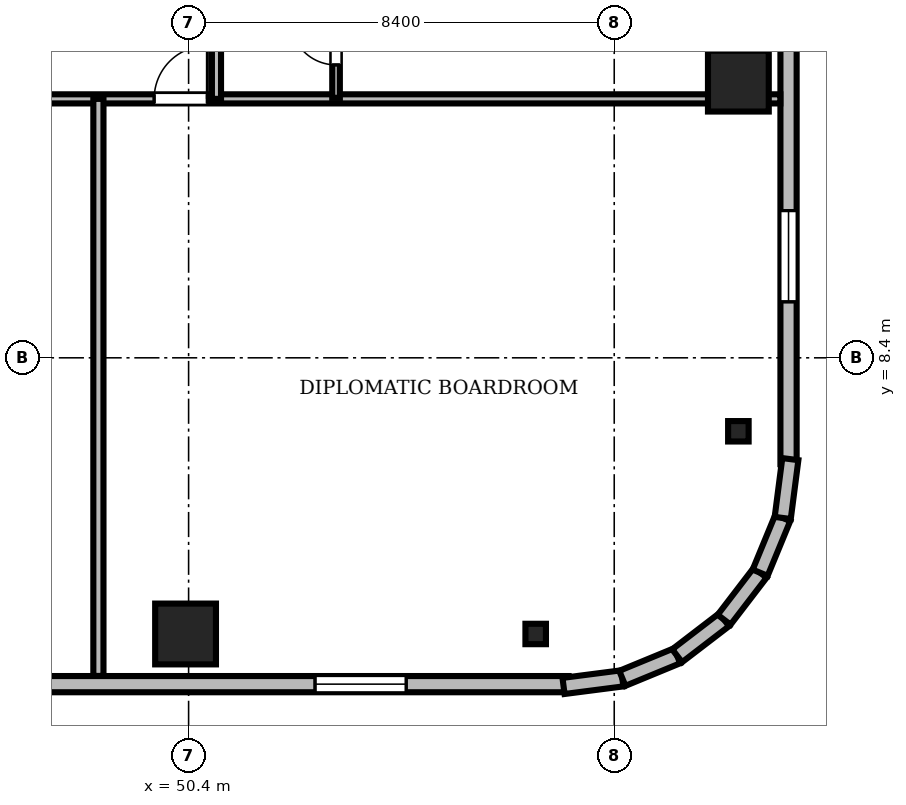
"""IFC4 building model, lengths in metres.
Left out: names, types, materials, properties, quantities, classifications, styles, units other than length and angle.
Written with IfcOpenShell. Run it as: python <this file> out.ifc"""

import sys

from ifc_helpers import new_model, si_unit, direction, frame, frame_2d, origin, origin_2d, place, context, subcontext, project, spatial, rectangle, i_section, extrude, source, transform, mapped, element, fill, save


model = new_model("IFC4")
c1 = context("Model", 3, precision=1e-05, world=origin(), true_north=direction((0.0, 1.0)))
c2 = subcontext(c1, "Body", "Model", "MODEL_VIEW")
j1 = project(units=[si_unit("LENGTHUNIT", "METRE"), si_unit("PLANEANGLEUNIT", "RADIAN")], contexts=[c1])
p1 = place(None, origin())
s1 = spatial("IfcSite", under=j1, at=p1, CompositionType="ELEMENT")
p2 = place(p1, origin())
s2 = spatial("IfcBuilding", under=s1, at=p2, CompositionType="ELEMENT")
p3 = place(p2, frame((0.0, 0.0, 250.6)))
s3 = spatial("IfcBuildingStorey", under=s2, at=p3, CompositionType="ELEMENT", Elevation=250.6)
m1 = source(origin(), c2, "Body", "SweptSolid", [
    extrude(rectangle(XDim=1.2, YDim=1.2, at=origin_2d()), origin(), (0.0, 0.0, 1.0), 3.65),
])
for number, where, z_axis, x_axis in (
    (1, (50.34, 2.95, 0.0), (0.0, 0.0, 1.0), (1.0, 0.0, 0.0)),
    (2, (61.25, 13.86, 0.0), (0.0, 0.0, 1.0), (1.0, 0.0, 0.0)),
):
    element("IfcColumn", number, at=place(p3, frame(where, z_axis=z_axis, x_axis=x_axis)), inside=s3, PredefinedType="COLUMN", context=c2, shape_type="MappedRepresentation", body=[
        mapped(m1, transform((0.0, 0.0, 0.0), scale=1.0)),
    ])
m2 = source(origin(), c2, "Body", "SweptSolid", [
    extrude(i_section(OverallWidth=0.405, OverallDepth=0.403, WebThickness=0.018, FlangeThickness=0.028, FilletRadius=0.015, at=origin_2d()), origin(), (0.0, 0.0, 1.0), 3.65),
])
for number, where, z_axis, x_axis in (
    (3, (57.25, 2.95, 0.0), (0.0, 0.0, 1.0), (1.0, 0.0, 0.0)),
    (4, (61.25, 6.95, 0.0), (0.0, 0.0, 1.0), (1.0, 0.0, 0.0)),
):
    element("IfcColumn", number, at=place(p3, frame(where, z_axis=z_axis, x_axis=x_axis)), inside=s3, PredefinedType="COLUMN", context=c2, shape_type="MappedRepresentation", body=[
        mapped(m2, transform((0.0, 0.0, 0.0), scale=1.0)),
    ])
m3 = source(origin(), c2, "Body", "SweptSolid", [
    extrude(rectangle(XDim=15.6, YDim=0.32, at=frame_2d((7.8, 0.0))), origin(), (0.0, 0.0, 1.0), 3.65),
])
p4 = place(p3, frame((42.3, 1.96, 0.0), z_axis=(0.0, 0.0, 1.0), x_axis=(1.0, 0.0, 0.0)))
e5 = element("IfcWall", 5, at=p4, inside=s3, PredefinedType="SOLIDWALL", context=c2, shape_type="MappedRepresentation", body=[
    mapped(m3, transform((0.0, 0.0, 0.0), scale=1.0)),
])
m4 = source(origin(), c2, "Body", "SweptSolid", [
    extrude(rectangle(XDim=1.8, YDim=2.4, at=frame_2d((0.9, 1.2))), frame((0.0, 0.17, 0.0), z_axis=(0.0, -1.0, 0.0), x_axis=(1.0, 0.0, 0.0)), (0.0, 0.0, 1.0), 0.34),
])
p5 = place(p4, frame((10.595, 0.0, 0.72)))
e6 = element("IfcOpeningElement", 6, at=p5, cuts=e5, PredefinedType="OPENING", context=c2, shape_type="MappedRepresentation", body=[
    mapped(m4, transform((0.0, 0.0, 0.0), scale=1.0)),
])
p6 = place(p3, frame((62.24, 6.3, 0.0), z_axis=(0.0, 0.0, 1.0), x_axis=(0.0, 1.0, 0.0)))
e7 = element("IfcWall", 7, at=p6, inside=s3, PredefinedType="SOLIDWALL", context=c2, shape_type="MappedRepresentation", body=[
    mapped(m3, transform((0.0, 0.0, 0.0), scale=1.0)),
])
m5 = source(origin(), c2, "Body", "SweptSolid", [
    extrude(rectangle(XDim=1.4, YDim=2.3, at=frame_2d((0.7, 1.15))), frame((0.0, 0.17, 0.0), z_axis=(0.0, -1.0, 0.0), x_axis=(1.0, 0.0, 0.0)), (0.0, 0.0, 1.0), 0.34),
])
p7 = place(p6, frame((9.61, 0.0, 0.0)))
e8 = element("IfcOpeningElement", 8, at=p7, cuts=e7, PredefinedType="OPENING", context=c2, shape_type="MappedRepresentation", body=[
    mapped(m5, transform((0.0, 0.0, 0.0), scale=1.0)),
])
p8 = place(p6, frame((3.205, 0.0, 0.72)))
e9 = element("IfcOpeningElement", 9, at=p8, cuts=e7, PredefinedType="OPENING", context=c2, shape_type="MappedRepresentation", body=[
    mapped(m4, transform((0.0, 0.0, 0.0), scale=1.0)),
])
m6 = source(origin(), c2, "Body", "SweptSolid", [
    extrude(rectangle(XDim=1.17, YDim=0.32, at=frame_2d((0.585, 0.0))), origin(), (0.0, 0.0, 1.0), 3.65),
])
p9 = place(p3, frame((57.8, 1.925, 0.0), z_axis=(0.0, 0.0, 1.0), x_axis=(0.991762485493, 0.128090485085, 0.0)))
e10 = element("IfcWall", 10, at=p9, inside=s3, PredefinedType="SOLIDWALL", context=c2, shape_type="MappedRepresentation", body=[
    mapped(m6, transform((0.0, 0.0, 0.0), scale=1.0)),
])
m7 = source(origin(), c2, "Body", "SweptSolid", [
    extrude(rectangle(XDim=1.169, YDim=0.32, at=frame_2d((0.585, 0.0))), origin(), (0.0, 0.0, 1.0), 3.65),
])
p10 = place(p3, frame((58.96, 2.074, 0.0), z_axis=(0.0, 0.0, 1.0), x_axis=(0.924479075121, 0.381232789334, 0.0)))
e11 = element("IfcWall", 11, at=p10, inside=s3, PredefinedType="SOLIDWALL", context=c2, shape_type="MappedRepresentation", body=[
    mapped(m7, transform((0.0, 0.0, 0.0), scale=1.0)),
])
m8 = source(origin(), c2, "Body", "SweptSolid", [
    extrude(rectangle(XDim=1.169, YDim=0.32, at=frame_2d((0.584, 0.0))), origin(), (0.0, 0.0, 1.0), 3.65),
])
p11 = place(p3, frame((60.041, 2.52, 0.0), z_axis=(0.0, 0.0, 1.0), x_axis=(0.793663520347, 0.608356981114, 0.0)))
e12 = element("IfcWall", 12, at=p11, inside=s3, PredefinedType="SOLIDWALL", context=c2, shape_type="MappedRepresentation", body=[
    mapped(m8, transform((0.0, 0.0, 0.0), scale=1.0)),
])
m9 = source(origin(), c2, "Body", "SweptSolid", [
    extrude(rectangle(XDim=1.169, YDim=0.32, at=frame_2d((0.584, 0.0))), origin(), (0.0, 0.0, 1.0), 3.65),
])
for number, where, z_axis, x_axis in (
    (13, (60.969, 3.231, 0.0), (0.0, 0.0, 1.0), (0.608, 0.794, 0.0)),
    (14, (61.68, 4.159, 0.0), (0.0, 0.0, 1.0), (0.381, 0.925, 0.0)),
):
    element("IfcWall", number, at=place(p3, frame(where, z_axis=z_axis, x_axis=x_axis)), inside=s3, PredefinedType="SOLIDWALL", context=c2, shape_type="MappedRepresentation", body=[
        mapped(m9, transform((0.0, 0.0, 0.0), scale=1.0)),
    ])
m10 = source(origin(), c2, "Body", "SweptSolid", [
    extrude(rectangle(XDim=1.171, YDim=0.32, at=frame_2d((0.585, 0.0))), origin(), (0.0, 0.0, 1.0), 3.65),
])
p12 = place(p3, frame((62.125, 5.24, 0.0), z_axis=(0.0, 0.0, 1.0), x_axis=(0.128269133229, 0.991739395941, 0.0)))
e15 = element("IfcWall", 15, at=p12, inside=s3, PredefinedType="SOLIDWALL", context=c2, shape_type="MappedRepresentation", body=[
    mapped(m10, transform((0.0, 0.0, 0.0), scale=1.0)),
])
m11 = source(origin(), c2, "Body", "SweptSolid", [
    extrude(rectangle(XDim=46.156, YDim=0.18, at=frame_2d((23.078, 0.0))), origin(), (0.0, 0.0, 1.0), 2.892),
])
p13 = place(p3, frame((15.922, 13.51, 0.0), z_axis=(0.0, 0.0, 1.0), x_axis=(1.0, 0.0, 0.0)))
e16 = element("IfcWall", 16, at=p13, inside=s3, PredefinedType="PARTITIONING", context=c2, shape_type="MappedRepresentation", body=[
    mapped(m11, transform((0.0, 0.0, 0.0), scale=1.0)),
])
m12 = source(origin(), c2, "Body", "SweptSolid", [
    extrude(rectangle(XDim=1.05, YDim=2.2, at=frame_2d((0.525, 1.1))), frame((0.0, 0.1, 0.0), z_axis=(0.0, -1.0, 0.0), x_axis=(1.0, 0.0, 0.0)), (0.0, 0.0, 1.0), 0.2),
])
p14 = place(p13, frame((7.298, 0.0, 0.0)))
e17 = element("IfcOpeningElement", 17, at=p14, cuts=e16, PredefinedType="OPENING", context=c2, shape_type="MappedRepresentation", body=[
    mapped(m12, transform((0.0, 0.0, 0.0), scale=1.0)),
])
p15 = place(p13, frame((10.384, 0.0, 0.0)))
e18 = element("IfcOpeningElement", 18, at=p15, cuts=e16, PredefinedType="OPENING", context=c2, shape_type="MappedRepresentation", body=[
    mapped(m12, transform((0.0, 0.0, 0.0), scale=1.0)),
])
p16 = place(p13, frame((15.647, 0.0, 0.0)))
e19 = element("IfcOpeningElement", 19, at=p16, cuts=e16, PredefinedType="OPENING", context=c2, shape_type="MappedRepresentation", body=[
    mapped(m12, transform((0.0, 0.0, 0.0), scale=1.0)),
])
p17 = place(p13, frame((21.659, 0.0, 0.0)))
e20 = element("IfcOpeningElement", 20, at=p17, cuts=e16, PredefinedType="OPENING", context=c2, shape_type="MappedRepresentation", body=[
    mapped(m12, transform((0.0, 0.0, 0.0), scale=1.0)),
])
p18 = place(p13, frame((28.422, 0.0, 0.0)))
e21 = element("IfcOpeningElement", 21, at=p18, cuts=e16, PredefinedType="OPENING", context=c2, shape_type="MappedRepresentation", body=[
    mapped(m12, transform((0.0, 0.0, 0.0), scale=1.0)),
])
p19 = place(p13, frame((33.798, 0.0, 0.0)))
e22 = element("IfcOpeningElement", 22, at=p19, cuts=e16, PredefinedType="OPENING", context=c2, shape_type="MappedRepresentation", body=[
    mapped(m12, transform((0.0, 0.0, 0.0), scale=1.0)),
])
m13 = source(origin(), c2, "Body", "SweptSolid", [
    extrude(rectangle(XDim=27.59, YDim=0.18, at=frame_2d((13.795, 0.0))), origin(), (0.0, 0.0, 1.0), 3.092),
])
p20 = place(p3, frame((50.95, 13.51, 0.0), z_axis=(0.0, 0.0, 1.0), x_axis=(0.0, 1.0, 0.0)))
e23 = element("IfcWall", 23, at=p20, inside=s3, PredefinedType="PARTITIONING", context=c2, shape_type="MappedRepresentation", body=[
    mapped(m13, transform((0.0, 0.0, 0.0), scale=1.0)),
])
p21 = place(p20, frame((4.086, 0.0, 0.0)))
e24 = element("IfcOpeningElement", 24, at=p21, cuts=e23, PredefinedType="OPENING", context=c2, shape_type="MappedRepresentation", body=[
    mapped(m12, transform((0.0, 0.0, 0.0), scale=1.0)),
])
p22 = place(p20, frame((9.744, 0.0, 0.0)))
e25 = element("IfcOpeningElement", 25, at=p22, cuts=e23, PredefinedType="OPENING", context=c2, shape_type="MappedRepresentation", body=[
    mapped(m12, transform((0.0, 0.0, 0.0), scale=1.0)),
])
p23 = place(p20, frame((17.771, 0.0, 0.0)))
e26 = element("IfcOpeningElement", 26, at=p23, cuts=e23, PredefinedType="OPENING", context=c2, shape_type="MappedRepresentation", body=[
    mapped(m12, transform((0.0, 0.0, 0.0), scale=1.0)),
])
p24 = place(p20, frame((24.614, 0.0, 0.0)))
e27 = element("IfcOpeningElement", 27, at=p24, cuts=e23, PredefinedType="OPENING", context=c2, shape_type="MappedRepresentation", body=[
    mapped(m12, transform((0.0, 0.0, 0.0), scale=1.0)),
])
m14 = source(origin(), c2, "Body", "SweptSolid", [
    extrude(rectangle(XDim=2.29, YDim=0.15, at=frame_2d((1.145, 0.0))), origin(), (0.0, 0.0, 1.0), 3.092),
])
p25 = place(p3, frame((53.31, 13.53, 0.0), z_axis=(0.0, 0.0, 1.0), x_axis=(0.0, 1.0, 0.0)))
e28 = element("IfcWall", 28, at=p25, inside=s3, PredefinedType="PARTITIONING", context=c2, shape_type="MappedRepresentation", body=[
    mapped(m14, transform((0.0, 0.0, 0.0), scale=1.0)),
])
m15 = source(origin(), c2, "Body", "SweptSolid", [
    extrude(rectangle(XDim=0.9, YDim=2.1, at=frame_2d((0.45, 1.05))), frame((0.0, 0.085, 0.0), z_axis=(0.0, -1.0, 0.0), x_axis=(1.0, 0.0, 0.0)), (0.0, 0.0, 1.0), 0.17),
])
p26 = place(p25, frame((0.65, 0.0, 0.0)))
e29 = element("IfcOpeningElement", 29, at=p26, cuts=e28, PredefinedType="OPENING", context=c2, shape_type="MappedRepresentation", body=[
    mapped(m15, transform((0.0, 0.0, 0.0), scale=1.0)),
])
m16 = source(origin(), c2, "Body", "SweptSolid", [
    extrude(rectangle(XDim=11.388, YDim=0.2, at=frame_2d((5.694, 0.0))), origin(), (0.0, 0.0, 1.0), 2.892),
])
p27 = place(p3, frame((48.62, 2.122, 0.0), z_axis=(0.0, 0.0, 1.0), x_axis=(0.0, 1.0, 0.0)))
e30 = element("IfcWall", 30, at=p27, inside=s3, PredefinedType="PARTITIONING", context=c2, shape_type="MappedRepresentation", body=[
    mapped(m16, transform((0.0, 0.0, 0.0), scale=1.0)),
])
m17 = source(origin(), c2, "Body", "SweptSolid", [
    extrude(rectangle(XDim=1.8, YDim=2.4, at=frame_2d((0.9, 1.2))), frame((0.0, 0.03, 0.0), z_axis=(0.0, -1.0, 0.0), x_axis=(1.0, 0.0, 0.0)), (0.0, 0.0, 1.0), 0.06),
])
p28 = place(p5, origin())
e31 = element("IfcWindow", 31, at=p28, inside=s3, PartitioningType="SINGLE_PANEL", PredefinedType="WINDOW", context=c2, shape_type="MappedRepresentation", body=[
    mapped(m17, transform((0.0, 0.0, 0.0), scale=1.0)),
])
fill(e6, e31)
p29 = place(p8, origin())
e32 = element("IfcWindow", 32, at=p29, inside=s3, PartitioningType="SINGLE_PANEL", PredefinedType="WINDOW", context=c2, shape_type="MappedRepresentation", body=[
    mapped(m17, transform((0.0, 0.0, 0.0), scale=1.0)),
])
fill(e9, e32)
m18 = source(origin(), c2, "Body", "SweptSolid", [
    extrude(rectangle(XDim=1.05, YDim=2.2, at=frame_2d((0.525, 1.1))), frame((0.0, 0.025, 0.0), z_axis=(0.0, -1.0, 0.0), x_axis=(1.0, 0.0, 0.0)), (0.0, 0.0, 1.0), 0.05),
])
p30 = place(p19, origin())
e33 = element("IfcDoor", 33, at=p30, inside=s3, OperationType="SINGLE_SWING_RIGHT", PredefinedType="DOOR", context=c2, shape_type="MappedRepresentation", body=[
    mapped(m18, transform((0.0, 0.0, 0.0), scale=1.0)),
])
fill(e22, e33)
m19 = source(origin(), c2, "Body", "SweptSolid", [
    extrude(rectangle(XDim=0.9, YDim=2.1, at=frame_2d((0.45, 1.05))), frame((0.0, 0.025, 0.0), z_axis=(0.0, -1.0, 0.0), x_axis=(1.0, 0.0, 0.0)), (0.0, 0.0, 1.0), 0.05),
])
p31 = place(p26, origin())
e34 = element("IfcDoor", 34, at=p31, inside=s3, OperationType="SINGLE_SWING_RIGHT", PredefinedType="DOOR", context=c2, shape_type="MappedRepresentation", body=[
    mapped(m19, transform((0.0, 0.0, 0.0), scale=1.0)),
])
fill(e29, e34)
save(model, sys.argv[1])
